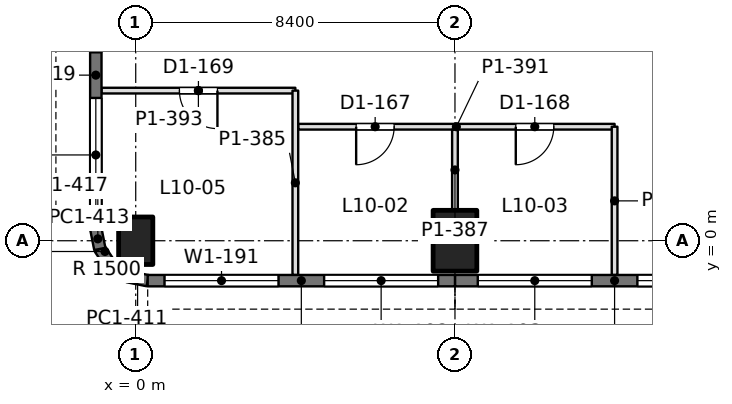
"""IFC4 building model, lengths in metres.
Left out: names, types, materials, properties, quantities, classifications, styles, units other than length and angle.
Written with IfcOpenShell. Run it as: python <this file> out.ifc"""

import sys

from ifc_helpers import new_model, si_unit, direction, frame, frame_2d, origin, origin_with_axes, origin_2d, place, context, subcontext, project, spatial, rectangle, extrude, element, fill, save


model = new_model("IFC4")
c1 = context("Model", 3, precision=1e-05, world=origin(), true_north=direction((0.0, 1.0)))
c2 = subcontext(c1, "Body", "Model", "MODEL_VIEW")
j1 = project(units=[si_unit("LENGTHUNIT", "METRE"), si_unit("PLANEANGLEUNIT", "RADIAN")], contexts=[c1])
p1 = place(None, origin())
s1 = spatial("IfcSite", under=j1, at=p1, CompositionType="ELEMENT")
p2 = place(p1, origin())
s2 = spatial("IfcBuilding", under=s1, at=p2, CompositionType="ELEMENT")
p3 = place(p2, frame((0.0, 0.0, 45.9)))
s3 = spatial("IfcBuildingStorey", under=s2, at=p3, CompositionType="ELEMENT", Elevation=45.9)
p4 = place(p3, origin_with_axes())
e1 = element("IfcColumn", 1, at=p4, inside=s3, PredefinedType="COLUMN", context=c2, shape_type="SweptSolid", body=[
    extrude(rectangle(XDim=0.9, YDim=1.25, at=origin_2d()), origin(), (0.0, 0.0, 1.0), 4.5),
])
p5 = place(p3, frame((8.4, 0.0, 0.0), z_axis=(0.0, 0.0, 1.0), x_axis=(1.0, 0.0, 0.0)))
e2 = element("IfcColumn", 2, at=p5, inside=s3, PredefinedType="COLUMN", context=c2, shape_type="SweptSolid", body=[
    extrude(rectangle(XDim=1.15, YDim=1.6, at=origin_2d()), origin(), (0.0, 0.0, 1.0), 4.5),
])
p6 = place(p3, frame((16.8, -1.05, 0.0), z_axis=(0.0, 0.0, 1.0), x_axis=(-1.0, 0.0, 0.0)))
e3 = element("IfcWall", 3, at=p6, inside=s3, PredefinedType="SOLIDWALL", context=c2, shape_type="SweptSolid", body=[
    extrude(rectangle(XDim=8.4, YDim=0.3, at=frame_2d((4.2, 0.0))), origin(), (0.0, 0.0, 1.0), 4.34),
])
p7 = place(p6, frame((0.6, 0.0, 0.9)))
e4 = element("IfcOpeningElement", 4, at=p7, cuts=e3, PredefinedType="OPENING", context=c2, shape_type="SweptSolid", body=[
    extrude(rectangle(XDim=3.0, YDim=1.9, at=frame_2d((1.5, 0.95))), frame((0.0, 0.16, 0.0), z_axis=(0.0, -1.0, 0.0), x_axis=(1.0, 0.0, 0.0)), (0.0, 0.0, 1.0), 0.32),
])
p8 = place(p6, frame((4.8, 0.0, 0.9)))
e5 = element("IfcOpeningElement", 5, at=p8, cuts=e3, PredefinedType="OPENING", context=c2, shape_type="SweptSolid", body=[
    extrude(rectangle(XDim=3.0, YDim=1.9, at=frame_2d((1.5, 0.95))), frame((0.0, 0.16, 0.0), z_axis=(0.0, -1.0, 0.0), x_axis=(1.0, 0.0, 0.0)), (0.0, 0.0, 1.0), 0.32),
])
p9 = place(p3, frame((8.4, -1.05, 0.0), z_axis=(0.0, 0.0, 1.0), x_axis=(-1.0, 0.0, 0.0)))
e6 = element("IfcWall", 6, at=p9, inside=s3, PredefinedType="SOLIDWALL", context=c2, shape_type="SweptSolid", body=[
    extrude(rectangle(XDim=8.085, YDim=0.3, at=frame_2d((4.042, 0.0))), origin(), (0.0, 0.0, 1.0), 4.34),
])
p10 = place(p9, frame((0.443, 0.0, 0.9)))
e7 = element("IfcOpeningElement", 7, at=p10, cuts=e6, PredefinedType="OPENING", context=c2, shape_type="SweptSolid", body=[
    extrude(rectangle(XDim=3.0, YDim=1.9, at=frame_2d((1.5, 0.95))), frame((0.0, 0.16, 0.0), z_axis=(0.0, -1.0, 0.0), x_axis=(1.0, 0.0, 0.0)), (0.0, 0.0, 1.0), 0.32),
])
p11 = place(p9, frame((4.643, 0.0, 0.9)))
e8 = element("IfcOpeningElement", 8, at=p11, cuts=e6, PredefinedType="OPENING", context=c2, shape_type="SweptSolid", body=[
    extrude(rectangle(XDim=3.0, YDim=1.9, at=frame_2d((1.5, 0.95))), frame((0.0, 0.16, 0.0), z_axis=(0.0, -1.0, 0.0), x_axis=(1.0, 0.0, 0.0)), (0.0, 0.0, 1.0), 0.32),
])
p12 = place(p3, frame((0.315, -1.05, 0.0), z_axis=(0.0, 0.0, 1.0), x_axis=(-0.980788534345, 0.195073962632, 0.0)))
e9 = element("IfcWall", 9, at=p12, inside=s3, PredefinedType="SOLIDWALL", context=c2, shape_type="SweptSolid", body=[
    extrude(rectangle(XDim=0.541, YDim=0.3, at=frame_2d((0.271, 0.0))), origin(), (0.0, 0.0, 1.0), 4.34),
])
for number, where, z_axis, x_axis in (
    (10, (-0.216, -0.945, 0.0), (0.0, 0.0, 1.0), (-0.831, 0.556, 0.0)),
    (11, (-0.653, -0.653, 0.0), (0.0, 0.0, 1.0), (-0.556, 0.831, 0.0)),
):
    element("IfcWall", number, at=place(p3, frame(where, z_axis=z_axis, x_axis=x_axis)), inside=s3, PredefinedType="SOLIDWALL", context=c2, shape_type="SweptSolid", body=[
        extrude(rectangle(XDim=0.526, YDim=0.3, at=frame_2d((0.263, 0.0))), origin(), (0.0, 0.0, 1.0), 4.34),
    ])
p13 = place(p3, frame((-0.945, -0.216, 0.0), z_axis=(0.0, 0.0, 1.0), x_axis=(-0.195073962632, 0.980788534345, 0.0)))
e12 = element("IfcWall", 12, at=p13, inside=s3, PredefinedType="SOLIDWALL", context=c2, shape_type="SweptSolid", body=[
    extrude(rectangle(XDim=0.541, YDim=0.3, at=frame_2d((0.271, 0.0))), origin(), (0.0, 0.0, 1.0), 4.34),
])
p14 = place(p3, frame((-1.05, 0.315, 0.0), z_axis=(0.0, 0.0, 1.0), x_axis=(0.0, 1.0, 0.0)))
e13 = element("IfcWall", 13, at=p14, inside=s3, PredefinedType="SOLIDWALL", context=c2, shape_type="SweptSolid", body=[
    extrude(rectangle(XDim=8.085, YDim=0.3, at=frame_2d((4.042, 0.0))), origin(), (0.0, 0.0, 1.0), 4.34),
])
p15 = place(p14, frame((0.443, 0.0, 0.9)))
e14 = element("IfcOpeningElement", 14, at=p15, cuts=e13, PredefinedType="OPENING", context=c2, shape_type="SweptSolid", body=[
    extrude(rectangle(XDim=3.0, YDim=1.9, at=frame_2d((1.5, 0.95))), frame((0.0, 0.16, 0.0), z_axis=(0.0, -1.0, 0.0), x_axis=(1.0, 0.0, 0.0)), (0.0, 0.0, 1.0), 0.32),
])
p16 = place(p14, frame((4.643, 0.0, 0.9)))
e15 = element("IfcOpeningElement", 15, at=p16, cuts=e13, PredefinedType="OPENING", context=c2, shape_type="SweptSolid", body=[
    extrude(rectangle(XDim=3.0, YDim=1.9, at=frame_2d((1.5, 0.95))), frame((0.0, 0.16, 0.0), z_axis=(0.0, -1.0, 0.0), x_axis=(1.0, 0.0, 0.0)), (0.0, 0.0, 1.0), 0.32),
])
p17 = place(p3, frame((-0.902, 3.95, 0.0), z_axis=(0.0, 0.0, 1.0), x_axis=(1.0, 0.0, 0.0)))
e16 = element("IfcWall", 16, at=p17, inside=s3, PredefinedType="PARTITIONING", context=c2, shape_type="SweptSolid", body=[
    extrude(rectangle(XDim=5.102, YDim=0.15, at=frame_2d((2.551, 0.0))), origin(), (0.0, 0.0, 1.0), 3.84),
])
p18 = place(p17, frame((2.052, 0.0, 0.0)))
e17 = element("IfcOpeningElement", 17, at=p18, cuts=e16, PredefinedType="OPENING", context=c2, shape_type="SweptSolid", body=[
    extrude(rectangle(XDim=1.0, YDim=2.2, at=frame_2d((0.5, 1.1))), frame((0.0, 0.085, 0.0), z_axis=(0.0, -1.0, 0.0), x_axis=(1.0, 0.0, 0.0)), (0.0, 0.0, 1.0), 0.17),
])
p19 = place(p3, frame((4.274, 3.0, 0.0), z_axis=(0.0, 0.0, 1.0), x_axis=(1.0, 0.0, 0.0)))
e18 = element("IfcWall", 18, at=p19, inside=s3, PredefinedType="PARTITIONING", context=c2, shape_type="SweptSolid", body=[
    extrude(rectangle(XDim=8.326, YDim=0.15, at=frame_2d((4.163, 0.0))), origin(), (0.0, 0.0, 1.0), 3.74),
])
p20 = place(p19, frame((1.526, 0.0, 0.0)))
e19 = element("IfcOpeningElement", 19, at=p20, cuts=e18, PredefinedType="OPENING", context=c2, shape_type="SweptSolid", body=[
    extrude(rectangle(XDim=1.0, YDim=2.2, at=frame_2d((0.5, 1.1))), frame((0.0, 0.085, 0.0), z_axis=(0.0, -1.0, 0.0), x_axis=(1.0, 0.0, 0.0)), (0.0, 0.0, 1.0), 0.17),
])
p21 = place(p19, frame((5.726, 0.0, 0.0)))
e20 = element("IfcOpeningElement", 20, at=p21, cuts=e18, PredefinedType="OPENING", context=c2, shape_type="SweptSolid", body=[
    extrude(rectangle(XDim=1.0, YDim=2.2, at=frame_2d((0.5, 1.1))), frame((0.0, 0.085, 0.0), z_axis=(0.0, -1.0, 0.0), x_axis=(1.0, 0.0, 0.0)), (0.0, 0.0, 1.0), 0.17),
])
p22 = place(p3, frame((4.2, -0.902, 0.0), z_axis=(0.0, 0.0, 1.0), x_axis=(0.0, 1.0, 0.0)))
e21 = element("IfcWall", 21, at=p22, inside=s3, PredefinedType="PARTITIONING", context=c2, shape_type="SweptSolid", body=[
    extrude(rectangle(XDim=4.852, YDim=0.15, at=frame_2d((2.426, 0.0))), origin(), (0.0, 0.0, 1.0), 3.84),
])
p23 = place(p3, frame((8.4, 0.799, 0.0), z_axis=(0.0, 0.0, 1.0), x_axis=(0.0, 1.0, 0.0)))
e22 = element("IfcWall", 22, at=p23, inside=s3, PredefinedType="PARTITIONING", context=c2, shape_type="SweptSolid", body=[
    extrude(rectangle(XDim=2.127, YDim=0.15, at=frame_2d((1.063, 0.0))), origin(), (0.0, 0.0, 1.0), 3.74),
])
p24 = place(p3, frame((12.6, -0.902, 0.0), z_axis=(0.0, 0.0, 1.0), x_axis=(0.0, 1.0, 0.0)))
e23 = element("IfcWall", 23, at=p24, inside=s3, PredefinedType="PARTITIONING", context=c2, shape_type="SweptSolid", body=[
    extrude(rectangle(XDim=3.902, YDim=0.15, at=frame_2d((1.951, 0.0))), origin(), (0.0, 0.0, 1.0), 3.84),
])
p25 = place(p7, origin())
e24 = element("IfcWindow", 24, at=p25, inside=s3, PartitioningType="SINGLE_PANEL", PredefinedType="WINDOW", context=c2, shape_type="SweptSolid", body=[
    extrude(rectangle(XDim=3.0, YDim=1.9, at=frame_2d((1.5, 0.95))), frame((0.0, 0.03, 0.0), z_axis=(0.0, -1.0, 0.0), x_axis=(1.0, 0.0, 0.0)), (0.0, 0.0, 1.0), 0.06),
])
fill(e4, e24)
p26 = place(p8, origin())
e25 = element("IfcWindow", 25, at=p26, inside=s3, PartitioningType="SINGLE_PANEL", PredefinedType="WINDOW", context=c2, shape_type="SweptSolid", body=[
    extrude(rectangle(XDim=3.0, YDim=1.9, at=frame_2d((1.5, 0.95))), frame((0.0, 0.03, 0.0), z_axis=(0.0, -1.0, 0.0), x_axis=(1.0, 0.0, 0.0)), (0.0, 0.0, 1.0), 0.06),
])
fill(e5, e25)
p27 = place(p10, origin())
e26 = element("IfcWindow", 26, at=p27, inside=s3, PartitioningType="SINGLE_PANEL", PredefinedType="WINDOW", context=c2, shape_type="SweptSolid", body=[
    extrude(rectangle(XDim=3.0, YDim=1.9, at=frame_2d((1.5, 0.95))), frame((0.0, 0.03, 0.0), z_axis=(0.0, -1.0, 0.0), x_axis=(1.0, 0.0, 0.0)), (0.0, 0.0, 1.0), 0.06),
])
fill(e7, e26)
p28 = place(p11, origin())
e27 = element("IfcWindow", 27, at=p28, inside=s3, PartitioningType="SINGLE_PANEL", PredefinedType="WINDOW", context=c2, shape_type="SweptSolid", body=[
    extrude(rectangle(XDim=3.0, YDim=1.9, at=frame_2d((1.5, 0.95))), frame((0.0, 0.03, 0.0), z_axis=(0.0, -1.0, 0.0), x_axis=(1.0, 0.0, 0.0)), (0.0, 0.0, 1.0), 0.06),
])
fill(e8, e27)
p29 = place(p15, origin())
e28 = element("IfcWindow", 28, at=p29, inside=s3, PartitioningType="SINGLE_PANEL", PredefinedType="WINDOW", context=c2, shape_type="SweptSolid", body=[
    extrude(rectangle(XDim=3.0, YDim=1.9, at=frame_2d((1.5, 0.95))), frame((0.0, 0.03, 0.0), z_axis=(0.0, -1.0, 0.0), x_axis=(1.0, 0.0, 0.0)), (0.0, 0.0, 1.0), 0.06),
])
fill(e14, e28)
p30 = place(p18, frame((1.0, 0.0, 0.0), z_axis=(0.0, 0.0, 1.0), x_axis=(-1.0, 0.0, 0.0)))
e29 = element("IfcDoor", 29, at=p30, inside=s3, OperationType="SINGLE_SWING_LEFT", PredefinedType="DOOR", context=c2, shape_type="SweptSolid", body=[
    extrude(rectangle(XDim=1.0, YDim=2.2, at=frame_2d((0.5, 1.1))), frame((0.0, 0.025, 0.0), z_axis=(0.0, -1.0, 0.0), x_axis=(1.0, 0.0, 0.0)), (0.0, 0.0, 1.0), 0.05),
])
fill(e17, e29)
p31 = place(p20, frame((1.0, 0.0, 0.0), z_axis=(0.0, 0.0, 1.0), x_axis=(-1.0, 0.0, 0.0)))
e30 = element("IfcDoor", 30, at=p31, inside=s3, OperationType="SINGLE_SWING_RIGHT", PredefinedType="DOOR", context=c2, shape_type="SweptSolid", body=[
    extrude(rectangle(XDim=1.0, YDim=2.2, at=frame_2d((0.5, 1.1))), frame((0.0, 0.025, 0.0), z_axis=(0.0, -1.0, 0.0), x_axis=(1.0, 0.0, 0.0)), (0.0, 0.0, 1.0), 0.05),
])
fill(e19, e30)
p32 = place(p21, frame((1.0, 0.0, 0.0), z_axis=(0.0, 0.0, 1.0), x_axis=(-1.0, 0.0, 0.0)))
e31 = element("IfcDoor", 31, at=p32, inside=s3, OperationType="SINGLE_SWING_RIGHT", PredefinedType="DOOR", context=c2, shape_type="SweptSolid", body=[
    extrude(rectangle(XDim=1.0, YDim=2.2, at=frame_2d((0.5, 1.1))), frame((0.0, 0.025, 0.0), z_axis=(0.0, -1.0, 0.0), x_axis=(1.0, 0.0, 0.0)), (0.0, 0.0, 1.0), 0.05),
])
fill(e20, e31)
save(model, sys.argv[1])
